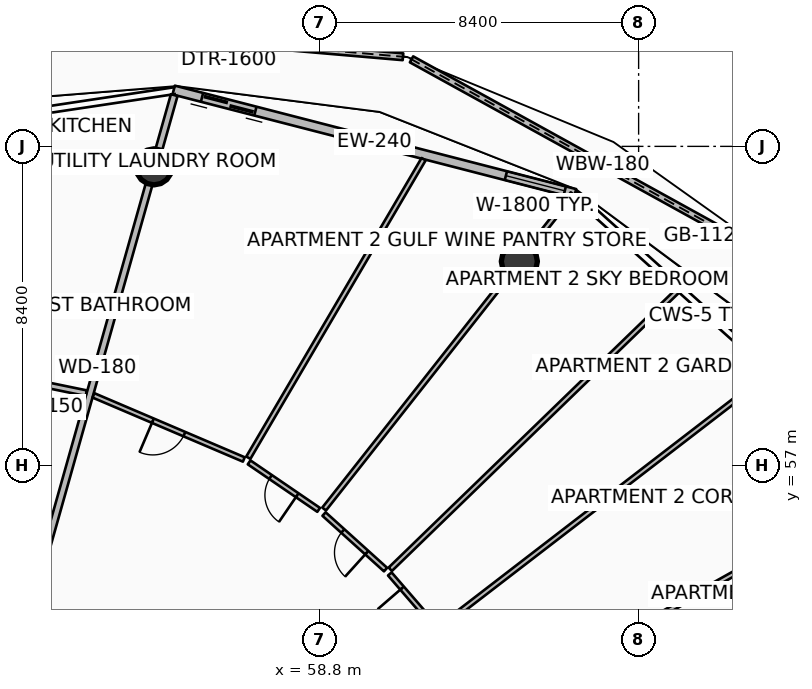
"""IFC4 building model, lengths in metres.
Left out: names, types, materials, properties, quantities, classifications, styles, units other than length and angle.
Written with IfcOpenShell. Run it as: python <this file> out.ifc"""

import sys

from ifc_helpers import new_model, si_unit, direction, frame, frame_2d, origin, origin_2d, place, context, subcontext, project, spatial, polyline, rectangle, circle, outline, extrude, element, fill, save


model = new_model("IFC4")
c1 = context("Model", 3, precision=1e-05, world=origin(), true_north=direction((0.0, 1.0)))
c2 = subcontext(c1, "Body", "Model", "MODEL_VIEW")
j1 = project(units=[si_unit("LENGTHUNIT", "METRE"), si_unit("PLANEANGLEUNIT", "RADIAN")], contexts=[c1])
p1 = place(None, origin())
s1 = spatial("IfcSite", under=j1, at=p1, CompositionType="ELEMENT")
p2 = place(p1, origin())
s2 = spatial("IfcBuilding", under=s1, at=p2, CompositionType="ELEMENT")
p3 = place(p2, frame((0.0, 0.0, 306.0)))
s3 = spatial("IfcBuildingStorey", under=s2, at=p3, CompositionType="ELEMENT", Elevation=306.0)
p4 = place(p3, frame((64.062, 62.374, 0.0), z_axis=(-0.212903289351, -0.270116064673, 0.938993876971), x_axis=(0.785372123188, -0.619023931782, 0.0)))
e1 = element("IfcColumn", 1, at=p4, inside=s3, PredefinedType="COLUMN", context=c2, shape_type="SweptSolid", body=[
    extrude(circle(Radius=0.475, at=origin_2d()), origin(), (0.0, 0.0, 1.0), 3.674),
])
p5 = place(p3, frame((54.448, 64.861, 0.0), z_axis=(-0.086284912029, -0.305955831144, 0.948127598662), x_axis=(0.962458159265, -0.271430086144, 0.0)))
e2 = element("IfcColumn", 2, at=p5, inside=s3, PredefinedType="COLUMN", context=c2, shape_type="SweptSolid", body=[
    extrude(circle(Radius=0.475, at=origin_2d()), origin(), (0.0, 0.0, 1.0), 3.639),
])
p6 = place(p3, frame((71.286, 62.135, 0.0), z_axis=(0.0, 0.0, 1.0), x_axis=(-0.87546271408, 0.483285667339, 0.0)))
e3 = element("IfcWall", 3, at=p6, inside=s3, PredefinedType="PARAPET", context=c2, shape_type="SweptSolid", body=[
    extrude(outline(polyline([(0.0, 0.0), (11.493, 0.0), (11.493, 1.148), (5.747, 1.127), (0.0, 1.224), (0.0, 0.0)])), frame((0.0, 0.09, 0.0), z_axis=(0.0, -1.0, 0.0), x_axis=(1.0, 0.0, 0.0)), (0.0, 0.0, 1.0), 0.18),
])
p7 = place(p3, frame((61.0, 67.758, 0.0), z_axis=(0.0, 0.0, 1.0), x_axis=(-0.996302227994, 0.085917812439, 0.0)))
e4 = element("IfcWall", 4, at=p7, inside=s3, PredefinedType="PARAPET", context=c2, shape_type="SweptSolid", body=[
    extrude(outline(polyline([(0.0, 0.0), (10.775, 0.0), (10.775, 1.483), (5.388, 1.284), (0.0, 1.148), (0.0, 0.0)])), frame((0.0, 0.09, 0.0), z_axis=(0.0, -1.0, 0.0), x_axis=(1.0, 0.0, 0.0)), (0.0, 0.0, 1.0), 0.18),
])
p8 = place(p3, frame((65.528, 64.16, 0.0), z_axis=(0.0, 0.0, 1.0), x_axis=(-0.968356587255, 0.249570671195, 0.0)))
e5 = element("IfcWall", 5, at=p8, inside=s3, PredefinedType="SOLIDWALL", context=c2, shape_type="SweptSolid", body=[
    extrude(rectangle(XDim=10.907, YDim=0.24, at=frame_2d((5.454, 0.0))), origin(), (0.0, 0.0, 1.0), 2.4),
])
p9 = place(p8, frame((8.688, 0.0, 0.0)))
e6 = element("IfcOpeningElement", 6, at=p9, cuts=e5, PredefinedType="OPENING", context=c2, shape_type="SweptSolid", body=[
    extrude(rectangle(XDim=1.45, YDim=2.15, at=frame_2d((0.725, 1.075))), frame((0.0, 0.13, 0.0), z_axis=(0.0, -1.0, 0.0), x_axis=(1.0, 0.0, 0.0)), (0.0, 0.0, 1.0), 0.26),
])
p10 = place(p8, frame((0.28, 0.0, 0.65)))
e7 = element("IfcOpeningElement", 7, at=p10, cuts=e5, PredefinedType="OPENING", context=c2, shape_type="SweptSolid", body=[
    extrude(rectangle(XDim=1.6, YDim=1.5, at=frame_2d((0.8, 0.75))), frame((0.0, 0.13, 0.0), z_axis=(0.0, -1.0, 0.0), x_axis=(1.0, 0.0, 0.0)), (0.0, 0.0, 1.0), 0.26),
])
p11 = place(p3, frame((50.935, 52.406, 0.0), z_axis=(0.0, 0.0, 1.0), x_axis=(0.27143720787, 0.962456150785, 0.0)))
e8 = element("IfcWall", 8, at=p11, inside=s3, PredefinedType="PARTITIONING", context=c2, shape_type="SweptSolid", body=[
    extrude(rectangle(XDim=14.903, YDim=0.18, at=frame_2d((7.451, 0.0))), origin(), (0.0, 0.0, 1.0), 2.407),
])
p12 = place(p3, frame((52.664, 58.906, 0.0), z_axis=(0.0, 0.0, 1.0), x_axis=(-0.979585392817, 0.201028500912, 0.0)))
e9 = element("IfcWall", 9, at=p12, inside=s3, PredefinedType="PARTITIONING", context=c2, shape_type="SweptSolid", body=[
    extrude(rectangle(XDim=2.35, YDim=0.15, at=frame_2d((1.175, 0.0))), origin(), (0.0, 0.0, 1.0), 2.407),
])
p13 = place(p3, frame((63.396, 50.622, 0.0), z_axis=(0.0, 0.0, 1.0), x_axis=(0.8724964858, 0.488620386667, 0.0)))
e10 = element("IfcWall", 10, at=p13, inside=s3, PredefinedType="PARTITIONING", context=c2, shape_type="SweptSolid", body=[
    extrude(rectangle(XDim=11.358, YDim=0.125, at=frame_2d((5.679, 0.0))), origin(), (0.0, 0.0, 1.0), 2.407),
])
p14 = place(p3, frame((61.978, 52.754, 0.0), z_axis=(0.0, 0.0, 1.0), x_axis=(0.792557966204, 0.609796581005, 0.0)))
e11 = element("IfcWall", 11, at=p14, inside=s3, PredefinedType="PARTITIONING", context=c2, shape_type="SweptSolid", body=[
    extrude(rectangle(XDim=10.998, YDim=0.125, at=frame_2d((5.499, 0.0))), origin(), (0.0, 0.0, 1.0), 2.425),
])
p15 = place(p3, frame((60.665, 54.273, 0.0), z_axis=(0.0, 0.0, 1.0), x_axis=(0.718137190606, 0.695901555874, 0.0)))
e12 = element("IfcWall", 12, at=p15, inside=s3, PredefinedType="PARTITIONING", context=c2, shape_type="SweptSolid", body=[
    extrude(rectangle(XDim=10.584, YDim=0.125, at=frame_2d((5.292, 0.0))), origin(), (0.0, 0.0, 1.0), 2.425),
])
p16 = place(p3, frame((61.854, 52.76, 0.0), z_axis=(0.0, 0.0, 1.0), x_axis=(-0.653948493608, 0.756539072162, 0.0)))
e13 = element("IfcWall", 13, at=p16, inside=s3, PredefinedType="PARTITIONING", context=c2, shape_type="SweptSolid", body=[
    extrude(rectangle(XDim=1.837, YDim=0.125, at=frame_2d((0.918, 0.0))), origin(), (0.0, 0.0, 1.0), 2.89),
])
p17 = place(p16, frame((0.494, 0.0, 0.0)))
e14 = element("IfcOpeningElement", 14, at=p17, cuts=e13, PredefinedType="OPENING", context=c2, shape_type="SweptSolid", body=[
    extrude(rectangle(XDim=0.85, YDim=2.06, at=frame_2d((0.425, 1.03))), frame((0.0, 0.073, 0.0), z_axis=(0.0, -1.0, 0.0), x_axis=(1.0, 0.0, 0.0)), (0.0, 0.0, 1.0), 0.145),
])
p18 = place(p3, frame((60.541, 54.264, 0.0), z_axis=(0.0, 0.0, 1.0), x_axis=(-0.742235558018, 0.670139072443, 0.0)))
e15 = element("IfcWall", 15, at=p18, inside=s3, PredefinedType="PARTITIONING", context=c2, shape_type="SweptSolid", body=[
    extrude(rectangle(XDim=2.181, YDim=0.125, at=frame_2d((1.09, 0.0))), origin(), (0.0, 0.0, 1.0), 2.407),
])
p19 = place(p18, frame((0.666, 0.0, 0.0)))
e16 = element("IfcOpeningElement", 16, at=p19, cuts=e15, PredefinedType="OPENING", context=c2, shape_type="SweptSolid", body=[
    extrude(rectangle(XDim=0.85, YDim=2.06, at=frame_2d((0.425, 1.03))), frame((0.0, 0.073, 0.0), z_axis=(0.0, -1.0, 0.0), x_axis=(1.0, 0.0, 0.0)), (0.0, 0.0, 1.0), 0.145),
])
p20 = place(p3, frame((58.925, 55.858, 0.0), z_axis=(0.0, 0.0, 1.0), x_axis=(0.619089572631, 0.785320381157, 0.0)))
e17 = element("IfcWall", 17, at=p20, inside=s3, PredefinedType="PARTITIONING", context=c2, shape_type="SweptSolid", body=[
    extrude(rectangle(XDim=10.563, YDim=0.125, at=frame_2d((5.281, 0.0))), origin(), (0.0, 0.0, 1.0), 2.407),
])
p21 = place(p3, frame((56.93, 57.208, 0.0), z_axis=(0.0, 0.0, 1.0), x_axis=(0.506357005421, 0.862323943226, 0.0)))
e18 = element("IfcWall", 18, at=p21, inside=s3, PredefinedType="PARTITIONING", context=c2, shape_type="SweptSolid", body=[
    extrude(rectangle(XDim=9.109, YDim=0.125, at=frame_2d((4.554, 0.0))), origin(), (0.0, 0.0, 1.0), 2.425),
])
p22 = place(p3, frame((58.78, 55.836, 0.0), z_axis=(0.0, 0.0, 1.0), x_axis=(-0.825777202557, 0.563996464295, 0.0)))
e19 = element("IfcWall", 19, at=p22, inside=s3, PredefinedType="PARTITIONING", context=c2, shape_type="SweptSolid", body=[
    extrude(rectangle(XDim=2.216, YDim=0.125, at=frame_2d((1.108, 0.0))), origin(), (0.0, 0.0, 1.0), 2.407),
])
p23 = place(p22, frame((0.683, 0.0, 0.0)))
e20 = element("IfcOpeningElement", 20, at=p23, cuts=e19, PredefinedType="OPENING", context=c2, shape_type="SweptSolid", body=[
    extrude(rectangle(XDim=0.85, YDim=2.06, at=frame_2d((0.425, 1.03))), frame((0.0, 0.073, 0.0), z_axis=(0.0, -1.0, 0.0), x_axis=(1.0, 0.0, 0.0)), (0.0, 0.0, 1.0), 0.145),
])
p24 = place(p3, frame((56.811, 57.162, 0.0), z_axis=(0.0, 0.0, 1.0), x_axis=(-0.919947770822, 0.392040940414, 0.0)))
e21 = element("IfcWall", 21, at=p24, inside=s3, PredefinedType="PARTITIONING", context=c2, shape_type="SweptSolid", body=[
    extrude(rectangle(XDim=4.3, YDim=0.125, at=frame_2d((2.15, 0.0))), origin(), (0.0, 0.0, 1.0), 2.407),
])
p25 = place(p24, frame((1.7, 0.0, 0.0)))
e22 = element("IfcOpeningElement", 22, at=p25, cuts=e21, PredefinedType="OPENING", context=c2, shape_type="SweptSolid", body=[
    extrude(rectangle(XDim=0.9, YDim=2.08, at=frame_2d((0.45, 1.04))), frame((0.0, 0.073, 0.0), z_axis=(0.0, -1.0, 0.0), x_axis=(1.0, 0.0, 0.0)), (0.0, 0.0, 1.0), 0.145),
])
p26 = place(p9, origin())
e23 = element("IfcDoor", 23, at=p26, inside=s3, OperationType="DOUBLE_DOOR_SLIDING", PredefinedType="DOOR", context=c2, shape_type="SweptSolid", body=[
    extrude(rectangle(XDim=1.45, YDim=2.15, at=frame_2d((0.725, 1.075))), frame((0.0, 0.025, 0.0), z_axis=(0.0, -1.0, 0.0), x_axis=(1.0, 0.0, 0.0)), (0.0, 0.0, 1.0), 0.05),
])
fill(e6, e23)
p27 = place(p10, origin())
e24 = element("IfcWindow", 24, at=p27, inside=s3, PartitioningType="SINGLE_PANEL", PredefinedType="WINDOW", context=c2, shape_type="SweptSolid", body=[
    extrude(rectangle(XDim=1.6, YDim=1.5, at=frame_2d((0.8, 0.75))), frame((0.0, 0.03, 0.0), z_axis=(0.0, -1.0, 0.0), x_axis=(1.0, 0.0, 0.0)), (0.0, 0.0, 1.0), 0.06),
])
fill(e7, e24)
p28 = place(p17, origin())
e25 = element("IfcDoor", 25, at=p28, inside=s3, OperationType="SINGLE_SWING_RIGHT", PredefinedType="DOOR", context=c2, shape_type="SweptSolid", body=[
    extrude(rectangle(XDim=0.85, YDim=2.06, at=frame_2d((0.425, 1.03))), frame((0.0, 0.025, 0.0), z_axis=(0.0, -1.0, 0.0), x_axis=(1.0, 0.0, 0.0)), (0.0, 0.0, 1.0), 0.05),
])
fill(e14, e25)
p29 = place(p19, origin())
e26 = element("IfcDoor", 26, at=p29, inside=s3, OperationType="SINGLE_SWING_LEFT", PredefinedType="DOOR", context=c2, shape_type="SweptSolid", body=[
    extrude(rectangle(XDim=0.85, YDim=2.06, at=frame_2d((0.425, 1.03))), frame((0.0, 0.025, 0.0), z_axis=(0.0, -1.0, 0.0), x_axis=(1.0, 0.0, 0.0)), (0.0, 0.0, 1.0), 0.05),
])
fill(e16, e26)
p30 = place(p23, origin())
e27 = element("IfcDoor", 27, at=p30, inside=s3, OperationType="SINGLE_SWING_LEFT", PredefinedType="DOOR", context=c2, shape_type="SweptSolid", body=[
    extrude(rectangle(XDim=0.85, YDim=2.06, at=frame_2d((0.425, 1.03))), frame((0.0, 0.025, 0.0), z_axis=(0.0, -1.0, 0.0), x_axis=(1.0, 0.0, 0.0)), (0.0, 0.0, 1.0), 0.05),
])
fill(e20, e27)
p31 = place(p25, origin())
e28 = element("IfcDoor", 28, at=p31, inside=s3, OperationType="SINGLE_SWING_RIGHT", PredefinedType="DOOR", context=c2, shape_type="SweptSolid", body=[
    extrude(rectangle(XDim=0.9, YDim=2.08, at=frame_2d((0.45, 1.04))), frame((0.0, 0.025, 0.0), z_axis=(0.0, -1.0, 0.0), x_axis=(1.0, 0.0, 0.0)), (0.0, 0.0, 1.0), 0.05),
])
fill(e22, e28)
save(model, sys.argv[1])
